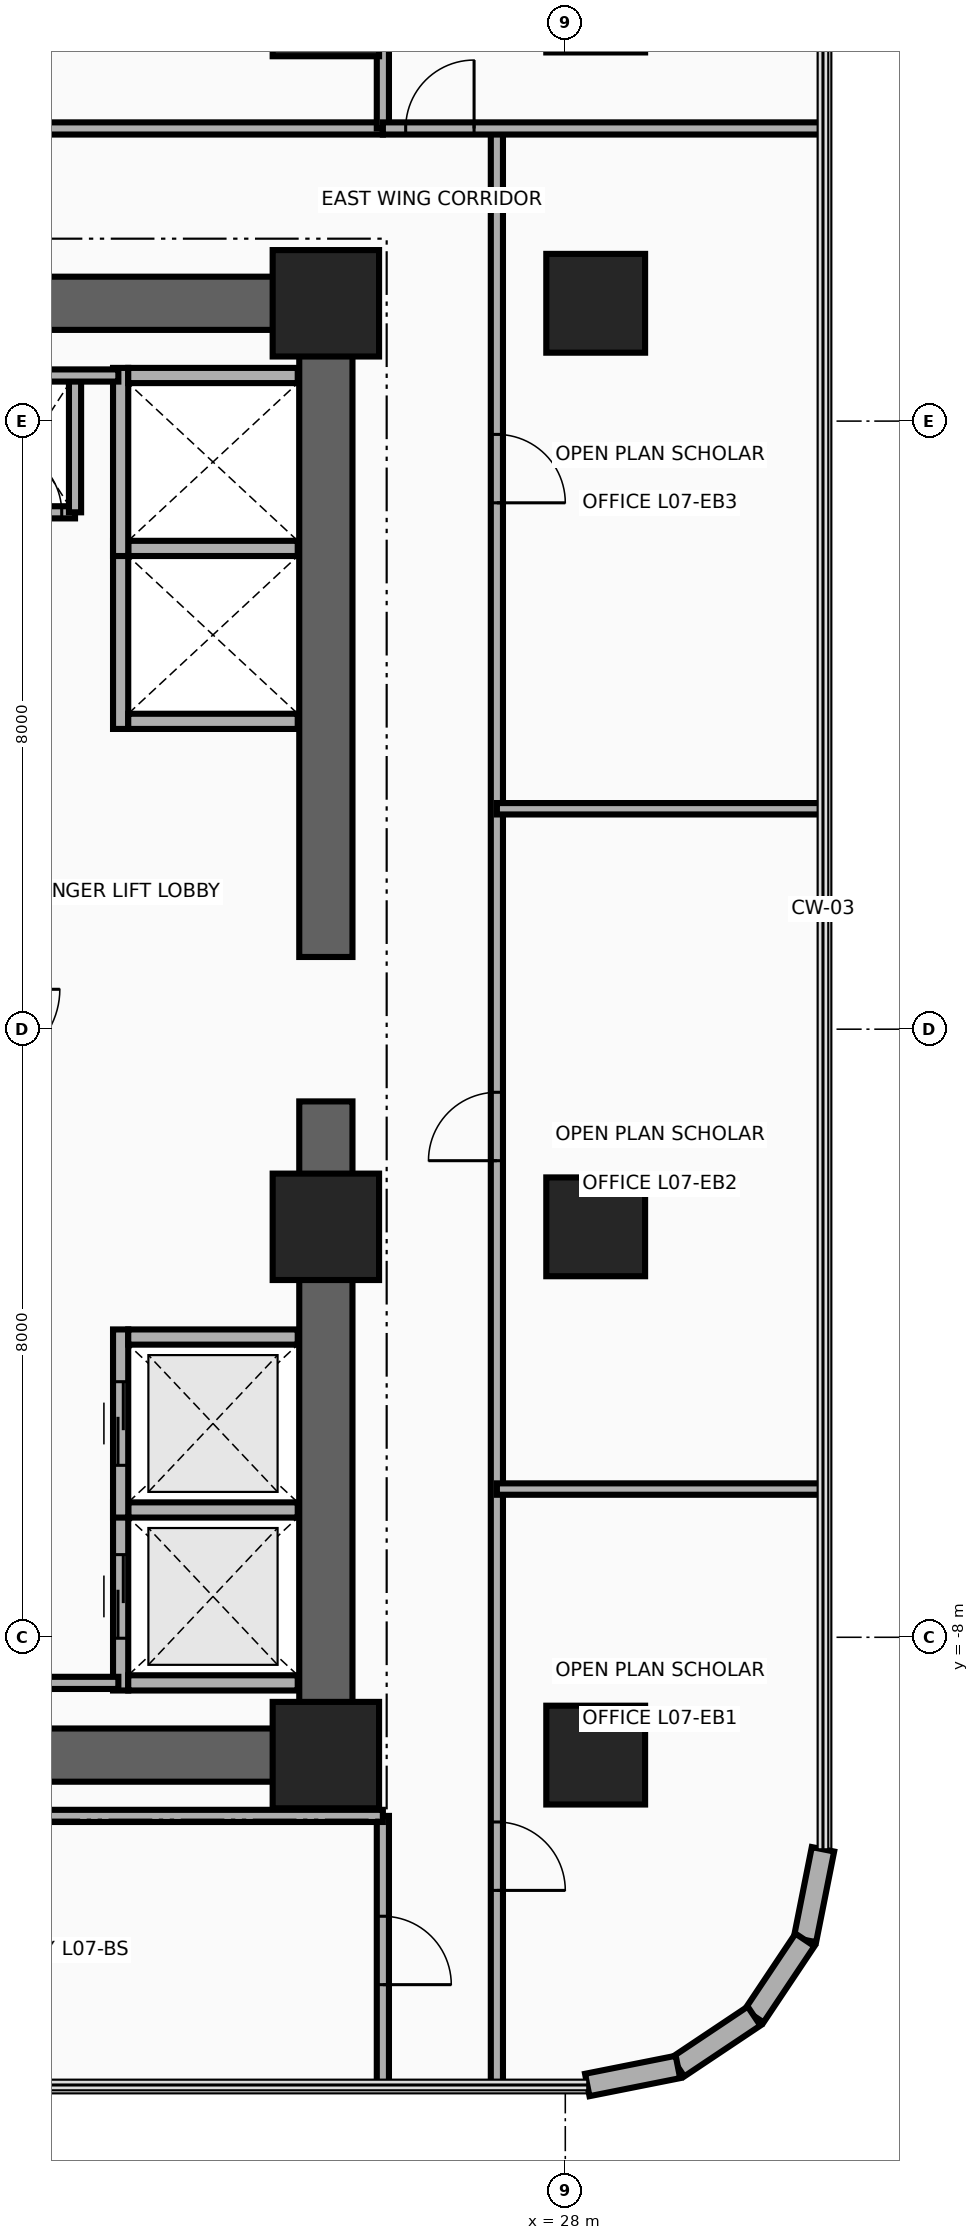
"""IFC4 building model, lengths in metres.
Left out: names, types, materials, properties, quantities, classifications, styles, units other than length and angle.
Written with IfcOpenShell. Run it as: python <this file> out.ifc"""

import sys

from ifc_helpers import new_model, si_unit, direction, frame, frame_2d, origin, origin_2d, place, context, subcontext, project, spatial, rectangle, circle, extrude, source, transform, mapped, element, fill, save


model = new_model("IFC4")
c1 = context("Model", 3, precision=1e-05, world=origin(), true_north=direction((0.0, 1.0)))
c2 = subcontext(c1, "Body", "Model", "MODEL_VIEW")
j1 = project(units=[si_unit("LENGTHUNIT", "METRE"), si_unit("PLANEANGLEUNIT", "RADIAN")], contexts=[c1])
p1 = place(None, origin())
s1 = spatial("IfcSite", under=j1, at=p1, CompositionType="ELEMENT")
p2 = place(p1, origin())
s2 = spatial("IfcBuilding", under=s1, at=p2, CompositionType="ELEMENT")
p3 = place(p2, frame((0.0, 0.0, 33.4)))
s3 = spatial("IfcBuildingStorey", under=s2, at=p3, CompositionType="ELEMENT", Elevation=33.4)
for number, where, z_axis, x_axis in (
    (1, (24.85, -9.9, 0.0), (0.0, 0.0, 1.0), (0.0, 1.0, 0.0)),
    (2, (24.85, 0.95, 0.0), (0.0, 0.0, 1.0), (0.0, 1.0, 0.0)),
):
    element("IfcWall", number, at=place(p3, frame(where, z_axis=z_axis, x_axis=x_axis)), inside=s3, PredefinedType="SHEAR", context=c2, shape_type="SweptSolid", body=[
        extrude(rectangle(XDim=8.95, YDim=0.7, at=frame_2d((4.475, 0.0))), origin(), (0.0, 0.0, 1.0), 3.46),
    ])
for number, where, z_axis, x_axis in (
    (3, (15.85, 9.55, 0.0), (0.0, 0.0, 1.0), (1.0, 0.0, 0.0)),
    (4, (15.85, -9.55, 0.0), (0.0, 0.0, 1.0), (1.0, 0.0, 0.0)),
):
    element("IfcWall", number, at=place(p3, frame(where, z_axis=z_axis, x_axis=x_axis)), inside=s3, PredefinedType="SHEAR", context=c2, shape_type="SweptSolid", body=[
        extrude(rectangle(XDim=9.0, YDim=0.7, at=frame_2d((4.5, 0.0))), origin(), (0.0, 0.0, 1.0), 3.46),
    ])
m1 = source(origin(), c2, "Body", "SweptSolid", [
    extrude(rectangle(XDim=1.4, YDim=1.4, at=origin_2d()), origin(), (0.0, 0.0, 1.0), 3.7),
])
p4 = place(p3, frame((24.85, -9.55, 0.0), z_axis=(0.0, 0.0, 1.0), x_axis=(1.0, 0.0, 0.0)))
e5 = element("IfcColumn", 5, at=p4, inside=s3, PredefinedType="COLUMN", context=c2, shape_type="MappedRepresentation", body=[
    mapped(m1, transform((0.0, 0.0, 0.0), x_axis=(1.0, 0.0, 0.0), y_axis=(0.0, 1.0, 0.0), z_axis=(0.0, 0.0, 1.0), scale=1.0)),
])
m2 = source(origin(), c2, "Body", "SweptSolid", [
    extrude(circle(Radius=0.65, at=origin_2d()), origin(), (0.0, 0.0, 1.0), 3.7),
])
p5 = place(p3, frame((28.4, -9.55, 0.0), z_axis=(0.0, 0.0, 1.0), x_axis=(1.0, 0.0, 0.0)))
e6 = element("IfcColumn", 6, at=p5, inside=s3, PredefinedType="COLUMN", context=c2, shape_type="MappedRepresentation", body=[
    mapped(m2, transform((0.0, 0.0, 0.0), x_axis=(1.0, 0.0, 0.0), y_axis=(0.0, 1.0, 0.0), z_axis=(0.0, 0.0, 1.0), scale=1.0)),
])
p6 = place(p3, frame((24.85, -2.6, 0.0), z_axis=(0.0, 0.0, 1.0), x_axis=(1.0, 0.0, 0.0)))
e7 = element("IfcColumn", 7, at=p6, inside=s3, PredefinedType="COLUMN", context=c2, shape_type="MappedRepresentation", body=[
    mapped(m1, transform((0.0, 0.0, 0.0), x_axis=(1.0, 0.0, 0.0), y_axis=(0.0, 1.0, 0.0), z_axis=(0.0, 0.0, 1.0), scale=1.0)),
])
p7 = place(p3, frame((28.4, -2.6, 0.0), z_axis=(0.0, 0.0, 1.0), x_axis=(1.0, 0.0, 0.0)))
e8 = element("IfcColumn", 8, at=p7, inside=s3, PredefinedType="COLUMN", context=c2, shape_type="MappedRepresentation", body=[
    mapped(m2, transform((0.0, 0.0, 0.0), x_axis=(1.0, 0.0, 0.0), y_axis=(0.0, 1.0, 0.0), z_axis=(0.0, 0.0, 1.0), scale=1.0)),
])
p8 = place(p3, frame((24.85, 9.55, 0.0), z_axis=(0.0, 0.0, 1.0), x_axis=(1.0, 0.0, 0.0)))
e9 = element("IfcColumn", 9, at=p8, inside=s3, PredefinedType="COLUMN", context=c2, shape_type="MappedRepresentation", body=[
    mapped(m1, transform((0.0, 0.0, 0.0), x_axis=(1.0, 0.0, 0.0), y_axis=(0.0, 1.0, 0.0), z_axis=(0.0, 0.0, 1.0), scale=1.0)),
])
p9 = place(p3, frame((28.4, 9.55, 0.0), z_axis=(0.0, 0.0, 1.0), x_axis=(1.0, 0.0, 0.0)))
e10 = element("IfcColumn", 10, at=p9, inside=s3, PredefinedType="COLUMN", context=c2, shape_type="MappedRepresentation", body=[
    mapped(m2, transform((0.0, 0.0, 0.0), x_axis=(1.0, 0.0, 0.0), y_axis=(0.0, 1.0, 0.0), z_axis=(0.0, 0.0, 1.0), scale=1.0)),
])
p10 = place(p3, frame((24.85, 13.5, 0.0), z_axis=(0.0, 0.0, 1.0), x_axis=(1.0, 0.0, 0.0)))
e11 = element("IfcColumn", 11, at=p10, inside=s3, PredefinedType="COLUMN", context=c2, shape_type="MappedRepresentation", body=[
    mapped(m1, transform((0.0, 0.0, 0.0), x_axis=(1.0, 0.0, 0.0), y_axis=(0.0, 1.0, 0.0), z_axis=(0.0, 0.0, 1.0), scale=1.0)),
])
p11 = place(p3, frame((31.39, -10.789, 0.0), z_axis=(0.0, 0.0, 1.0), x_axis=(-0.194996050505, -0.980804027463, 0.0)))
e12 = element("IfcWall", 12, at=p11, inside=s3, PredefinedType="SOLIDWALL", context=c2, shape_type="SweptSolid", body=[
    extrude(rectangle(XDim=1.216, YDim=0.3, at=frame_2d((0.608, 0.0))), origin(), (0.0, 0.0, 1.0), 3.46),
])
for number, where, z_axis, x_axis in (
    (13, (31.153, -11.982, 0.0), (0.0, 0.0, 1.0), (-0.556, -0.831, 0.0)),
    (14, (30.483, -12.983, 0.0), (0.0, 0.0, 1.0), (-0.831, -0.556, 0.0)),
):
    element("IfcWall", number, at=place(p3, frame(where, z_axis=z_axis, x_axis=x_axis)), inside=s3, PredefinedType="SOLIDWALL", context=c2, shape_type="SweptSolid", body=[
        extrude(rectangle(XDim=1.205, YDim=0.3, at=frame_2d((0.603, 0.0))), origin(), (0.0, 0.0, 1.0), 3.46),
    ])
p12 = place(p3, frame((29.482, -13.653, 0.0), z_axis=(0.0, 0.0, 1.0), x_axis=(-0.980804027463, -0.194996050505, 0.0)))
e15 = element("IfcWall", 15, at=p12, inside=s3, PredefinedType="SOLIDWALL", context=c2, shape_type="SweptSolid", body=[
    extrude(rectangle(XDim=1.216, YDim=0.3, at=frame_2d((0.608, 0.0))), origin(), (0.0, 0.0, 1.0), 3.46),
])
p13 = place(p3, frame((22.15, -8.7, 0.0), z_axis=(0.0, 0.0, 1.0), x_axis=(0.0, 1.0, 0.0)))
e16 = element("IfcWall", 16, at=p13, inside=s3, PredefinedType="MOVABLE", context=c2, shape_type="SweptSolid", body=[
    extrude(rectangle(XDim=2.475, YDim=0.2, at=frame_2d((1.237, 0.0))), origin(), (0.0, 0.0, 1.0), 3.46),
])
p14 = place(p13, frame((0.688, 0.0, 0.0)))
e17 = element("IfcOpeningElement", 17, at=p14, cuts=e16, PredefinedType="OPENING", context=c2, shape_type="SweptSolid", body=[
    extrude(rectangle(XDim=1.1, YDim=2.1, at=frame_2d((0.55, 1.05))), frame((0.0, 0.115, 0.0), z_axis=(0.0, -1.0, 0.0), x_axis=(1.0, 0.0, 0.0)), (0.0, 0.0, 1.0), 0.23),
])
for number, where, z_axis, x_axis in (
    (18, (22.25, -8.6, 0.0), (0.0, 0.0, 1.0), (1.0, 0.0, 0.0)),
    (19, (22.25, -6.325, 0.0), (0.0, 0.0, 1.0), (1.0, 0.0, 0.0)),
):
    element("IfcWall", number, at=place(p3, frame(where, z_axis=z_axis, x_axis=x_axis)), inside=s3, PredefinedType="MOVABLE", context=c2, shape_type="SweptSolid", body=[
        extrude(rectangle(XDim=2.23, YDim=0.2, at=frame_2d((1.115, 0.0))), origin(), (0.0, 0.0, 1.0), 3.46),
    ])
p15 = place(p3, frame((22.15, -6.425, 0.0), z_axis=(0.0, 0.0, 1.0), x_axis=(0.0, 1.0, 0.0)))
e20 = element("IfcWall", 20, at=p15, inside=s3, PredefinedType="MOVABLE", context=c2, shape_type="SweptSolid", body=[
    extrude(rectangle(XDim=2.475, YDim=0.2, at=frame_2d((1.238, 0.0))), origin(), (0.0, 0.0, 1.0), 3.46),
])
p16 = place(p15, frame((0.688, 0.0, 0.0)))
e21 = element("IfcOpeningElement", 21, at=p16, cuts=e20, PredefinedType="OPENING", context=c2, shape_type="SweptSolid", body=[
    extrude(rectangle(XDim=1.1, YDim=2.1, at=frame_2d((0.55, 1.05))), frame((0.0, 0.115, 0.0), z_axis=(0.0, -1.0, 0.0), x_axis=(1.0, 0.0, 0.0)), (0.0, 0.0, 1.0), 0.23),
])
p17 = place(p3, frame((22.25, -4.05, 0.0), z_axis=(0.0, 0.0, 1.0), x_axis=(1.0, 0.0, 0.0)))
e22 = element("IfcWall", 22, at=p17, inside=s3, PredefinedType="MOVABLE", context=c2, shape_type="SweptSolid", body=[
    extrude(rectangle(XDim=2.23, YDim=0.2, at=frame_2d((1.115, 0.0))), origin(), (0.0, 0.0, 1.0), 3.46),
])
p18 = place(p3, frame((22.15, 3.95, 0.0), z_axis=(0.0, 0.0, 1.0), x_axis=(0.0, 1.0, 0.0)))
e23 = element("IfcWall", 23, at=p18, inside=s3, PredefinedType="MOVABLE", context=c2, shape_type="SweptSolid", body=[
    extrude(rectangle(XDim=2.475, YDim=0.2, at=frame_2d((1.238, 0.0))), origin(), (0.0, 0.0, 1.0), 3.46),
])
for number, where, z_axis, x_axis in (
    (24, (22.25, 4.05, 0.0), (0.0, 0.0, 1.0), (1.0, 0.0, 0.0)),
    (25, (22.25, 6.325, 0.0), (0.0, 0.0, 1.0), (1.0, 0.0, 0.0)),
):
    element("IfcWall", number, at=place(p3, frame(where, z_axis=z_axis, x_axis=x_axis)), inside=s3, PredefinedType="MOVABLE", context=c2, shape_type="SweptSolid", body=[
        extrude(rectangle(XDim=2.23, YDim=0.2, at=frame_2d((1.115, 0.0))), origin(), (0.0, 0.0, 1.0), 2.245),
    ])
p19 = place(p3, frame((22.15, 6.225, 0.0), z_axis=(0.0, 0.0, 1.0), x_axis=(0.0, 1.0, 0.0)))
e26 = element("IfcWall", 26, at=p19, inside=s3, PredefinedType="MOVABLE", context=c2, shape_type="SweptSolid", body=[
    extrude(rectangle(XDim=2.475, YDim=0.2, at=frame_2d((1.237, 0.0))), origin(), (0.0, 0.0, 1.0), 3.46),
])
p20 = place(p3, frame((22.25, 8.6, 0.0), z_axis=(0.0, 0.0, 1.0), x_axis=(1.0, 0.0, 0.0)))
e27 = element("IfcWall", 27, at=p20, inside=s3, PredefinedType="MOVABLE", context=c2, shape_type="SweptSolid", body=[
    extrude(rectangle(XDim=2.23, YDim=0.2, at=frame_2d((1.115, 0.0))), origin(), (0.0, 0.0, 1.0), 2.245),
])
p21 = place(p3, frame((20.35, 6.8, 0.0), z_axis=(0.0, 0.0, 1.0), x_axis=(1.0, 0.0, 0.0)))
e28 = element("IfcWall", 28, at=p21, inside=s3, PredefinedType="PARTITIONING", context=c2, shape_type="SweptSolid", body=[
    extrude(rectangle(XDim=1.2, YDim=0.16, at=frame_2d((0.6, 0.0))), origin(), (0.0, 0.0, 1.0), 3.46),
])
p22 = place(p21, frame((0.175, 0.0, 0.0)))
e29 = element("IfcOpeningElement", 29, at=p22, cuts=e28, PredefinedType="OPENING", context=c2, shape_type="SweptSolid", body=[
    extrude(rectangle(XDim=0.85, YDim=2.05, at=frame_2d((0.425, 1.025))), frame((0.0, 0.095, 0.0), z_axis=(0.0, -1.0, 0.0), x_axis=(1.0, 0.0, 0.0)), (0.0, 0.0, 1.0), 0.19),
])
p23 = place(p3, frame((21.55, 6.8, 0.0), z_axis=(0.0, 0.0, 1.0), x_axis=(0.0, 1.0, 0.0)))
e30 = element("IfcWall", 30, at=p23, inside=s3, PredefinedType="PARTITIONING", context=c2, shape_type="SweptSolid", body=[
    extrude(rectangle(XDim=1.8, YDim=0.16, at=frame_2d((0.9, 0.0))), origin(), (0.0, 0.0, 1.0), 3.46),
])
for number, where, z_axis, x_axis in (
    (31, (20.3, -8.6, 0.0), (0.0, 0.0, 1.0), (1.0, 0.0, 0.0)),
    (32, (20.3, 8.6, 0.0), (0.0, 0.0, 1.0), (1.0, 0.0, 0.0)),
):
    element("IfcWall", number, at=place(p3, frame(where, z_axis=z_axis, x_axis=x_axis)), inside=s3, PredefinedType="PARTITIONING", context=c2, shape_type="SweptSolid", body=[
        extrude(rectangle(XDim=1.82, YDim=0.16, at=frame_2d((0.91, 0.0))), origin(), (0.0, 0.0, 1.0), 3.46),
    ])
p24 = place(p3, frame((15.4, 11.85, 0.0), z_axis=(0.0, 0.0, 1.0), x_axis=(1.0, 0.0, 0.0)))
e33 = element("IfcWall", 33, at=p24, inside=s3, PredefinedType="PARTITIONING", context=c2, shape_type="SweptSolid", body=[
    extrude(rectangle(XDim=10.2, YDim=0.16, at=frame_2d((5.1, 0.0))), origin(), (0.0, 0.0, 1.0), 2.834),
])
p25 = place(p24, frame((4.65, 0.0, 0.0)))
e34 = element("IfcOpeningElement", 34, at=p25, cuts=e33, PredefinedType="OPENING", context=c2, shape_type="SweptSolid", body=[
    extrude(rectangle(XDim=0.9, YDim=2.1, at=frame_2d((0.45, 1.05))), frame((0.0, 0.095, 0.0), z_axis=(0.0, -1.0, 0.0), x_axis=(1.0, 0.0, 0.0)), (0.0, 0.0, 1.0), 0.19),
])
p26 = place(p3, frame((25.6, 11.85, 0.0), z_axis=(0.0, 0.0, 1.0), x_axis=(0.0, 1.0, 0.0)))
e35 = element("IfcWall", 35, at=p26, inside=s3, PredefinedType="PARTITIONING", context=c2, shape_type="SweptSolid", body=[
    extrude(rectangle(XDim=5.898, YDim=0.16, at=frame_2d((2.949, 0.0))), origin(), (0.0, 0.0, 1.0), 2.583),
])
p27 = place(p3, frame((25.6, -13.89, 0.0), z_axis=(0.0, 0.0, 1.0), x_axis=(0.0, 1.0, 0.0)))
e36 = element("IfcWall", 36, at=p27, inside=s3, PredefinedType="PARTITIONING", context=c2, shape_type="SweptSolid", body=[
    extrude(rectangle(XDim=3.54, YDim=0.16, at=frame_2d((1.77, 0.0))), origin(), (0.0, 0.0, 1.0), 3.46),
])
p28 = place(p27, frame((1.32, 0.0, 0.0)))
e37 = element("IfcOpeningElement", 37, at=p28, cuts=e36, PredefinedType="OPENING", context=c2, shape_type="SweptSolid", body=[
    extrude(rectangle(XDim=0.9, YDim=2.1, at=frame_2d((0.45, 1.05))), frame((0.0, 0.095, 0.0), z_axis=(0.0, -1.0, 0.0), x_axis=(1.0, 0.0, 0.0)), (0.0, 0.0, 1.0), 0.19),
])
p29 = place(p3, frame((13.41, -10.35, 0.0), z_axis=(0.0, 0.0, 1.0), x_axis=(1.0, 0.0, 0.0)))
e38 = element("IfcWall", 38, at=p29, inside=s3, PredefinedType="PARTITIONING", context=c2, shape_type="SweptSolid", body=[
    extrude(rectangle(XDim=12.19, YDim=0.16, at=frame_2d((6.095, 0.0))), origin(), (0.0, 0.0, 1.0), 3.46),
])
p30 = place(p3, frame((27.1, -13.89, 0.0), z_axis=(0.0, 0.0, 1.0), x_axis=(0.0, 1.0, 0.0)))
e39 = element("IfcWall", 39, at=p30, inside=s3, PredefinedType="PARTITIONING", context=c2, shape_type="SweptSolid", body=[
    extrude(rectangle(XDim=25.74, YDim=0.16, at=frame_2d((12.87, 0.0))), origin(), (0.0, 0.0, 1.0), 2.583),
])
p31 = place(p30, frame((2.56, 0.0, 0.0)))
e40 = element("IfcOpeningElement", 40, at=p31, cuts=e39, PredefinedType="OPENING", context=c2, shape_type="SweptSolid", body=[
    extrude(rectangle(XDim=0.9, YDim=2.1, at=frame_2d((0.45, 1.05))), frame((0.0, 0.095, 0.0), z_axis=(0.0, -1.0, 0.0), x_axis=(1.0, 0.0, 0.0)), (0.0, 0.0, 1.0), 0.19),
])
p32 = place(p30, frame((12.16, 0.0, 0.0)))
e41 = element("IfcOpeningElement", 41, at=p32, cuts=e39, PredefinedType="OPENING", context=c2, shape_type="SweptSolid", body=[
    extrude(rectangle(XDim=0.9, YDim=2.1, at=frame_2d((0.45, 1.05))), frame((0.0, 0.095, 0.0), z_axis=(0.0, -1.0, 0.0), x_axis=(1.0, 0.0, 0.0)), (0.0, 0.0, 1.0), 0.19),
])
p33 = place(p30, frame((20.815, 0.0, 0.0)))
e42 = element("IfcOpeningElement", 42, at=p33, cuts=e39, PredefinedType="OPENING", context=c2, shape_type="SweptSolid", body=[
    extrude(rectangle(XDim=0.9, YDim=2.1, at=frame_2d((0.45, 1.05))), frame((0.0, 0.095, 0.0), z_axis=(0.0, -1.0, 0.0), x_axis=(1.0, 0.0, 0.0)), (0.0, 0.0, 1.0), 0.19),
])
p34 = place(p3, frame((25.6, 11.85, 0.0), z_axis=(0.0, 0.0, 1.0), x_axis=(1.0, 0.0, 0.0)))
e43 = element("IfcWall", 43, at=p34, inside=s3, PredefinedType="PARTITIONING", context=c2, shape_type="SweptSolid", body=[
    extrude(rectangle(XDim=5.79, YDim=0.16, at=frame_2d((2.895, 0.0))), origin(), (0.0, 0.0, 1.0), 2.896),
])
p35 = place(p34, frame((0.3, 0.0, 0.0)))
e44 = element("IfcOpeningElement", 44, at=p35, cuts=e43, PredefinedType="OPENING", context=c2, shape_type="SweptSolid", body=[
    extrude(rectangle(XDim=0.9, YDim=2.1, at=frame_2d((0.45, 1.05))), frame((0.0, 0.095, 0.0), z_axis=(0.0, -1.0, 0.0), x_axis=(1.0, 0.0, 0.0)), (0.0, 0.0, 1.0), 0.19),
])
for number, where, z_axis, x_axis in (
    (45, (27.1, -6.05, 0.0), (0.0, 0.0, 1.0), (1.0, 0.0, 0.0)),
    (46, (27.1, 2.9, 0.0), (0.0, 0.0, 1.0), (1.0, 0.0, 0.0)),
):
    element("IfcWall", number, at=place(p3, frame(where, z_axis=z_axis, x_axis=x_axis)), inside=s3, PredefinedType="PARTITIONING", context=c2, shape_type="SweptSolid", body=[
        extrude(rectangle(XDim=4.29, YDim=0.15, at=frame_2d((2.145, 0.0))), origin(), (0.0, 0.0, 1.0), 2.896),
    ])
p36 = place(p14, origin())
e47 = element("IfcDoor", 47, at=p36, inside=s3, OperationType="DOUBLE_DOOR_SLIDING", PredefinedType="DOOR", context=c2, shape_type="SweptSolid", body=[
    extrude(rectangle(XDim=1.1, YDim=2.1, at=frame_2d((0.55, 1.05))), frame((0.0, 0.025, 0.0), z_axis=(0.0, -1.0, 0.0), x_axis=(1.0, 0.0, 0.0)), (0.0, 0.0, 1.0), 0.05),
])
fill(e17, e47)
p37 = place(p16, origin())
e48 = element("IfcDoor", 48, at=p37, inside=s3, OperationType="DOUBLE_DOOR_SLIDING", PredefinedType="DOOR", context=c2, shape_type="SweptSolid", body=[
    extrude(rectangle(XDim=1.1, YDim=2.1, at=frame_2d((0.55, 1.05))), frame((0.0, 0.025, 0.0), z_axis=(0.0, -1.0, 0.0), x_axis=(1.0, 0.0, 0.0)), (0.0, 0.0, 1.0), 0.05),
])
fill(e21, e48)
p38 = place(p22, origin())
e49 = element("IfcDoor", 49, at=p38, inside=s3, OperationType="SINGLE_SWING_RIGHT", PredefinedType="DOOR", context=c2, shape_type="SweptSolid", body=[
    extrude(rectangle(XDim=0.85, YDim=2.05, at=frame_2d((0.425, 1.025))), frame((0.0, 0.025, 0.0), z_axis=(0.0, -1.0, 0.0), x_axis=(1.0, 0.0, 0.0)), (0.0, 0.0, 1.0), 0.05),
])
fill(e29, e49)
p39 = place(p28, frame((0.9, 0.0, 0.0), z_axis=(0.0, 0.0, 1.0), x_axis=(-1.0, 0.0, 0.0)))
e50 = element("IfcDoor", 50, at=p39, inside=s3, OperationType="SINGLE_SWING_LEFT", PredefinedType="DOOR", context=c2, shape_type="SweptSolid", body=[
    extrude(rectangle(XDim=0.9, YDim=2.1, at=frame_2d((0.45, 1.05))), frame((0.0, 0.025, 0.0), z_axis=(0.0, -1.0, 0.0), x_axis=(1.0, 0.0, 0.0)), (0.0, 0.0, 1.0), 0.05),
])
fill(e37, e50)
p40 = place(p35, origin())
e51 = element("IfcDoor", 51, at=p40, inside=s3, OperationType="SINGLE_SWING_RIGHT", PredefinedType="DOOR", context=c2, shape_type="SweptSolid", body=[
    extrude(rectangle(XDim=0.9, YDim=2.1, at=frame_2d((0.45, 1.05))), frame((0.0, 0.025, 0.0), z_axis=(0.0, -1.0, 0.0), x_axis=(1.0, 0.0, 0.0)), (0.0, 0.0, 1.0), 0.05),
])
fill(e44, e51)
p41 = place(p31, frame((0.9, 0.0, 0.0), z_axis=(0.0, 0.0, 1.0), x_axis=(-1.0, 0.0, 0.0)))
e52 = element("IfcDoor", 52, at=p41, inside=s3, OperationType="SINGLE_SWING_LEFT", PredefinedType="DOOR", context=c2, shape_type="SweptSolid", body=[
    extrude(rectangle(XDim=0.9, YDim=2.1, at=frame_2d((0.45, 1.05))), frame((0.0, 0.025, 0.0), z_axis=(0.0, -1.0, 0.0), x_axis=(1.0, 0.0, 0.0)), (0.0, 0.0, 1.0), 0.05),
])
fill(e40, e52)
p42 = place(p32, origin())
e53 = element("IfcDoor", 53, at=p42, inside=s3, OperationType="SINGLE_SWING_RIGHT", PredefinedType="DOOR", context=c2, shape_type="SweptSolid", body=[
    extrude(rectangle(XDim=0.9, YDim=2.1, at=frame_2d((0.45, 1.05))), frame((0.0, 0.025, 0.0), z_axis=(0.0, -1.0, 0.0), x_axis=(1.0, 0.0, 0.0)), (0.0, 0.0, 1.0), 0.05),
])
fill(e41, e53)
p43 = place(p33, frame((0.9, 0.0, 0.0), z_axis=(0.0, 0.0, 1.0), x_axis=(-1.0, 0.0, 0.0)))
e54 = element("IfcDoor", 54, at=p43, inside=s3, OperationType="SINGLE_SWING_LEFT", PredefinedType="DOOR", context=c2, shape_type="SweptSolid", body=[
    extrude(rectangle(XDim=0.9, YDim=2.1, at=frame_2d((0.45, 1.05))), frame((0.0, 0.025, 0.0), z_axis=(0.0, -1.0, 0.0), x_axis=(1.0, 0.0, 0.0)), (0.0, 0.0, 1.0), 0.05),
])
fill(e42, e54)
save(model, sys.argv[1])
